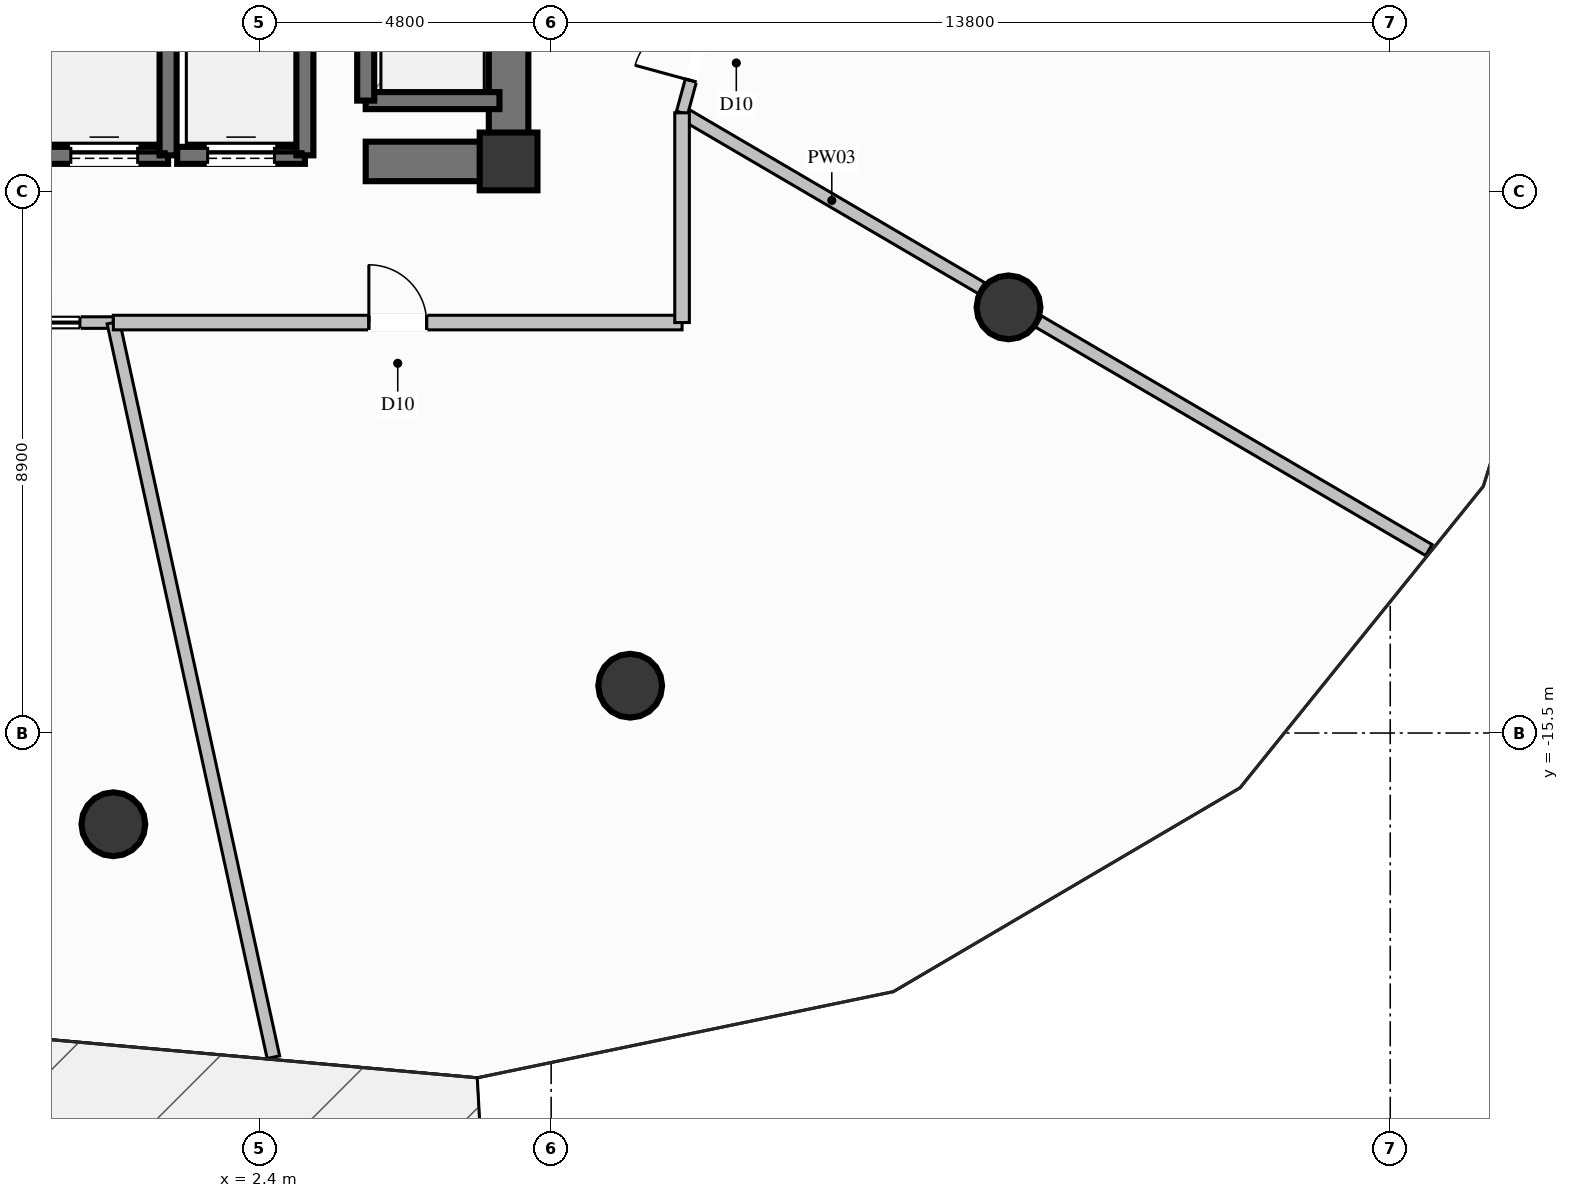
"""IFC4 building model, lengths in metres.
Left out: names, types, materials, properties, quantities, classifications, styles, units other than length and angle.
Written with IfcOpenShell. Run it as: python <this file> out.ifc"""

import sys

from ifc_helpers import new_model, si_unit, direction, frame, frame_2d, origin, origin_2d, place, context, subcontext, project, spatial, rectangle, circle, extrude, element, fill, save


model = new_model("IFC4")
c1 = context("Model", 3, precision=1e-05, world=origin(), true_north=direction((0.0, 1.0)))
c2 = subcontext(c1, "Body", "Model", "MODEL_VIEW")
j1 = project(units=[si_unit("LENGTHUNIT", "METRE"), si_unit("PLANEANGLEUNIT", "RADIAN")], contexts=[c1])
p1 = place(None, origin())
s1 = spatial("IfcSite", under=j1, at=p1, CompositionType="ELEMENT")
p2 = place(p1, origin())
s2 = spatial("IfcBuilding", under=s1, at=p2, CompositionType="ELEMENT")
p3 = place(p2, frame((0.0, 0.0, 98.0)))
s3 = spatial("IfcBuildingStorey", under=s2, at=p3, CompositionType="ELEMENT", Elevation=98.0)
p4 = place(p3, frame((6.5, -6.1, 0.0), z_axis=(0.0, 0.0, 1.0), x_axis=(1.0, 0.0, 0.0)))
e1 = element("IfcColumn", 1, at=p4, inside=s3, PredefinedType="COLUMN", context=c2, shape_type="SweptSolid", body=[
    extrude(rectangle(XDim=0.95, YDim=0.95, at=origin_2d()), origin(), (0.0, 0.0, 1.0), 4.6),
])
p5 = place(p3, frame((4.15, -6.1, 0.0), z_axis=(0.0, 0.0, 1.0), x_axis=(1.0, 0.0, 0.0)))
e2 = element("IfcWall", 2, at=p5, inside=s3, PredefinedType="SHEAR", context=c2, shape_type="SweptSolid", body=[
    extrude(rectangle(XDim=2.025, YDim=0.65, at=frame_2d((1.013, 0.0))), origin(), (0.0, 0.0, 1.0), 4.6),
])
p6 = place(p3, frame((6.5, -6.425, 0.0), z_axis=(0.0, 0.0, 1.0), x_axis=(0.0, 1.0, 0.0)))
e3 = element("IfcWall", 3, at=p6, inside=s3, PredefinedType="SHEAR", context=c2, shape_type="SweptSolid", body=[
    extrude(rectangle(XDim=4.075, YDim=0.65, at=frame_2d((2.038, 0.0))), origin(), (0.0, 0.0, 1.0), 4.6),
])
for number, where, z_axis, x_axis in (
    (4, (0.0, -17.0, 0.0), (0.0, 0.0, 1.0), (1.0, 0.0, 0.0)),
    (5, (8.5, -14.722, 0.0), (0.0, 0.0, 1.0), (1.0, 0.0, 0.0)),
    (6, (14.722, -8.5, 0.0), (0.0, 0.0, 1.0), (1.0, 0.0, 0.0)),
):
    element("IfcColumn", number, at=place(p3, frame(where, z_axis=z_axis, x_axis=x_axis)), inside=s3, PredefinedType="COLUMN", context=c2, shape_type="SweptSolid", body=[
        extrude(circle(Radius=0.525, at=origin_2d()), origin(), (0.0, 0.0, 1.0), 4.6),
    ])
p7 = place(p3, frame((-1.2, -6.0, 0.0), z_axis=(0.0, 0.0, 1.0), x_axis=(1.0, 0.0, 0.0)))
e7 = element("IfcWall", 7, at=p7, inside=s3, PredefinedType="SOLIDWALL", context=c2, shape_type="SweptSolid", body=[
    extrude(rectangle(XDim=2.1, YDim=0.28, at=frame_2d((1.05, 0.0))), origin(), (0.0, 0.0, 1.0), 4.35),
])
p8 = place(p7, frame((0.5, 0.0, 0.0)))
e8 = element("IfcOpeningElement", 8, at=p8, cuts=e7, PredefinedType="OPENING", context=c2, shape_type="SweptSolid", body=[
    extrude(rectangle(XDim=1.1, YDim=2.2, at=frame_2d((0.55, 1.1))), frame((0.0, 0.15, 0.0), z_axis=(0.0, -1.0, 0.0), x_axis=(1.0, 0.0, 0.0)), (0.0, 0.0, 1.0), 0.3),
])
p9 = place(p3, frame((0.9, -6.0, 0.0), z_axis=(0.0, 0.0, 1.0), x_axis=(0.0, 1.0, 0.0)))
e9 = element("IfcWall", 9, at=p9, inside=s3, PredefinedType="SOLIDWALL", context=c2, shape_type="SweptSolid", body=[
    extrude(rectangle(XDim=2.5, YDim=0.28, at=frame_2d((1.25, 0.0))), origin(), (0.0, 0.0, 1.0), 4.35),
])
p10 = place(p3, frame((1.05, -6.0, 0.0), z_axis=(0.0, 0.0, 1.0), x_axis=(1.0, 0.0, 0.0)))
e10 = element("IfcWall", 10, at=p10, inside=s3, PredefinedType="SOLIDWALL", context=c2, shape_type="SweptSolid", body=[
    extrude(rectangle(XDim=2.1, YDim=0.28, at=frame_2d((1.05, 0.0))), origin(), (0.0, 0.0, 1.0), 4.35),
])
p11 = place(p10, frame((0.5, 0.0, 0.0)))
e11 = element("IfcOpeningElement", 11, at=p11, cuts=e10, PredefinedType="OPENING", context=c2, shape_type="SweptSolid", body=[
    extrude(rectangle(XDim=1.1, YDim=2.2, at=frame_2d((0.55, 1.1))), frame((0.0, 0.15, 0.0), z_axis=(0.0, -1.0, 0.0), x_axis=(1.0, 0.0, 0.0)), (0.0, 0.0, 1.0), 0.3),
])
p12 = place(p3, frame((3.15, -6.0, 0.0), z_axis=(0.0, 0.0, 1.0), x_axis=(0.0, 1.0, 0.0)))
e12 = element("IfcWall", 12, at=p12, inside=s3, PredefinedType="SOLIDWALL", context=c2, shape_type="SweptSolid", body=[
    extrude(rectangle(XDim=2.5, YDim=0.28, at=frame_2d((1.25, 0.0))), origin(), (0.0, 0.0, 1.0), 4.35),
])
p13 = place(p3, frame((4.15, -5.1, 0.0), z_axis=(0.0, 0.0, 1.0), x_axis=(1.0, 0.0, 0.0)))
e13 = element("IfcWall", 13, at=p13, inside=s3, PredefinedType="SOLIDWALL", context=c2, shape_type="SweptSolid", body=[
    extrude(rectangle(XDim=2.2, YDim=0.28, at=frame_2d((1.1, 0.0))), origin(), (0.0, 0.0, 1.0), 4.35),
])
p14 = place(p3, frame((4.15, -2.4, 0.0), z_axis=(0.0, 0.0, 1.0), x_axis=(0.0, -1.0, 0.0)))
e14 = element("IfcWall", 14, at=p14, inside=s3, PredefinedType="SOLIDWALL", context=c2, shape_type="SweptSolid", body=[
    extrude(rectangle(XDim=2.7, YDim=0.28, at=frame_2d((1.35, 0.0))), origin(), (0.0, 0.0, 1.0), 4.35),
])
p15 = place(p3, frame((9.353, -5.3, 0.0), z_axis=(0.0, 0.0, 1.0), x_axis=(0.862932126693, -0.505319843981, 0.0)))
e15 = element("IfcWall", 15, at=p15, inside=s3, PredefinedType="PARTITIONING", context=c2, shape_type="SweptSolid", body=[
    extrude(rectangle(XDim=5.707, YDim=0.21, at=frame_2d((2.854, 0.0))), origin(), (0.0, 0.0, 1.0), 3.718),
])
p16 = place(p3, frame((15.215, -8.732, 0.0), z_axis=(0.0, 0.0, 1.0), x_axis=(0.862954092822, -0.505282330665, 0.0)))
e16 = element("IfcWall", 16, at=p16, inside=s3, PredefinedType="PARTITIONING", context=c2, shape_type="SweptSolid", body=[
    extrude(rectangle(XDim=7.439, YDim=0.21, at=frame_2d((3.72, 0.0))), origin(), (0.0, 0.0, 1.0), 4.35),
])
p17 = place(p3, frame((9.353, -5.3, 0.0), z_axis=(0.0, 0.0, 1.0), x_axis=(0.263380602271, 0.964692001805, 0.0)))
e17 = element("IfcWall", 17, at=p17, inside=s3, PredefinedType="PARTITIONING", context=c2, shape_type="SweptSolid", body=[
    extrude(rectangle(XDim=5.494, YDim=0.19, at=frame_2d((2.747, 0.0))), origin(), (0.0, 0.0, 1.0), 4.35),
])
p18 = place(p17, frame((0.55, 0.0, 0.0)))
e18 = element("IfcOpeningElement", 18, at=p18, cuts=e17, PredefinedType="OPENING", context=c2, shape_type="SweptSolid", body=[
    extrude(rectangle(XDim=0.95, YDim=2.1, at=frame_2d((0.475, 1.05))), frame((0.0, 0.105, 0.0), z_axis=(0.0, -1.0, 0.0), x_axis=(1.0, 0.0, 0.0)), (0.0, 0.0, 1.0), 0.21),
])
p19 = place(p17, frame((3.344, 0.0, 0.9)))
e19 = element("IfcOpeningElement", 19, at=p19, cuts=e17, PredefinedType="OPENING", context=c2, shape_type="SweptSolid", body=[
    extrude(rectangle(XDim=1.6, YDim=1.4, at=frame_2d((0.8, 0.7))), frame((0.0, 0.105, 0.0), z_axis=(0.0, -1.0, 0.0), x_axis=(1.0, 0.0, 0.0)), (0.0, 0.0, 1.0), 0.21),
])
p20 = place(p3, frame((-9.353, -8.75, 0.0), z_axis=(0.0, 0.0, 1.0), x_axis=(1.0, 0.0, 0.0)))
e20 = element("IfcWall", 20, at=p20, inside=s3, PredefinedType="PARTITIONING", context=c2, shape_type="SweptSolid", body=[
    extrude(rectangle(XDim=9.353, YDim=0.19, at=frame_2d((4.677, 0.0))), origin(), (0.0, 0.0, 1.0), 4.35),
])
p21 = place(p20, frame((0.55, 0.0, 0.0)))
e21 = element("IfcOpeningElement", 21, at=p21, cuts=e20, PredefinedType="OPENING", context=c2, shape_type="SweptSolid", body=[
    extrude(rectangle(XDim=0.95, YDim=2.1, at=frame_2d((0.475, 1.05))), frame((0.0, 0.105, 0.0), z_axis=(0.0, -1.0, 0.0), x_axis=(1.0, 0.0, 0.0)), (0.0, 0.0, 1.0), 0.21),
])
p22 = place(p20, frame((7.203, 0.0, 0.9)))
e22 = element("IfcOpeningElement", 22, at=p22, cuts=e20, PredefinedType="OPENING", context=c2, shape_type="SweptSolid", body=[
    extrude(rectangle(XDim=1.6, YDim=1.4, at=frame_2d((0.8, 0.7))), frame((0.0, 0.105, 0.0), z_axis=(0.0, -1.0, 0.0), x_axis=(1.0, 0.0, 0.0)), (0.0, 0.0, 1.0), 0.21),
])
p23 = place(p3, frame((0.0, -8.75, 0.0), z_axis=(0.0, 0.0, 1.0), x_axis=(0.212874748332, -0.97707949601, 0.0)))
e23 = element("IfcWall", 23, at=p23, inside=s3, PredefinedType="PARTITIONING", context=c2, shape_type="SweptSolid", body=[
    extrude(rectangle(XDim=12.365, YDim=0.21, at=frame_2d((6.182, 0.0))), origin(), (0.0, 0.0, 1.0), 4.35),
])
p24 = place(p3, frame((0.0, -8.75, 0.0), z_axis=(0.0, 0.0, 1.0), x_axis=(1.0, 0.0, 0.0)))
e24 = element("IfcWall", 24, at=p24, inside=s3, PredefinedType="PARTITIONING", context=c2, shape_type="SweptSolid", body=[
    extrude(rectangle(XDim=9.353, YDim=0.24, at=frame_2d((4.677, 0.0))), origin(), (0.0, 0.0, 1.0), 4.35),
])
p25 = place(p24, frame((4.202, 0.0, 0.0)))
e25 = element("IfcOpeningElement", 25, at=p25, cuts=e24, PredefinedType="OPENING", context=c2, shape_type="SweptSolid", body=[
    extrude(rectangle(XDim=0.95, YDim=2.1, at=frame_2d((0.475, 1.05))), frame((0.0, 0.13, 0.0), z_axis=(0.0, -1.0, 0.0), x_axis=(1.0, 0.0, 0.0)), (0.0, 0.0, 1.0), 0.26),
])
p26 = place(p3, frame((9.353, -8.75, 0.0), z_axis=(0.0, 0.0, 1.0), x_axis=(0.0, 1.0, 0.0)))
e26 = element("IfcWall", 26, at=p26, inside=s3, PredefinedType="PARTITIONING", context=c2, shape_type="SweptSolid", body=[
    extrude(rectangle(XDim=3.45, YDim=0.24, at=frame_2d((1.725, 0.0))), origin(), (0.0, 0.0, 1.0), 4.35),
])
p27 = place(p8, origin())
e27 = element("IfcDoor", 27, at=p27, inside=s3, OperationType="SLIDING_TO_LEFT", PredefinedType="DOOR", context=c2, shape_type="SweptSolid", body=[
    extrude(rectangle(XDim=1.1, YDim=2.2, at=frame_2d((0.55, 1.1))), frame((0.0, 0.025, 0.0), z_axis=(0.0, -1.0, 0.0), x_axis=(1.0, 0.0, 0.0)), (0.0, 0.0, 1.0), 0.05),
])
fill(e8, e27)
p28 = place(p11, origin())
e28 = element("IfcDoor", 28, at=p28, inside=s3, OperationType="SLIDING_TO_LEFT", PredefinedType="DOOR", context=c2, shape_type="SweptSolid", body=[
    extrude(rectangle(XDim=1.1, YDim=2.2, at=frame_2d((0.55, 1.1))), frame((0.0, 0.025, 0.0), z_axis=(0.0, -1.0, 0.0), x_axis=(1.0, 0.0, 0.0)), (0.0, 0.0, 1.0), 0.05),
])
fill(e11, e28)
p29 = place(p18, origin())
e29 = element("IfcDoor", 29, at=p29, inside=s3, OperationType="SINGLE_SWING_LEFT", PredefinedType="DOOR", context=c2, shape_type="SweptSolid", body=[
    extrude(rectangle(XDim=0.95, YDim=2.1, at=frame_2d((0.475, 1.05))), frame((0.0, 0.025, 0.0), z_axis=(0.0, -1.0, 0.0), x_axis=(1.0, 0.0, 0.0)), (0.0, 0.0, 1.0), 0.05),
])
fill(e18, e29)
p30 = place(p22, origin())
e30 = element("IfcWindow", 30, at=p30, inside=s3, PartitioningType="SINGLE_PANEL", PredefinedType="WINDOW", context=c2, shape_type="SweptSolid", body=[
    extrude(rectangle(XDim=1.6, YDim=1.4, at=frame_2d((0.8, 0.7))), frame((0.0, 0.03, 0.0), z_axis=(0.0, -1.0, 0.0), x_axis=(1.0, 0.0, 0.0)), (0.0, 0.0, 1.0), 0.06),
])
fill(e22, e30)
p31 = place(p25, origin())
e31 = element("IfcDoor", 31, at=p31, inside=s3, OperationType="SINGLE_SWING_LEFT", PredefinedType="DOOR", context=c2, shape_type="SweptSolid", body=[
    extrude(rectangle(XDim=0.95, YDim=2.1, at=frame_2d((0.475, 1.05))), frame((0.0, 0.025, 0.0), z_axis=(0.0, -1.0, 0.0), x_axis=(1.0, 0.0, 0.0)), (0.0, 0.0, 1.0), 0.05),
])
fill(e25, e31)
save(model, sys.argv[1])
